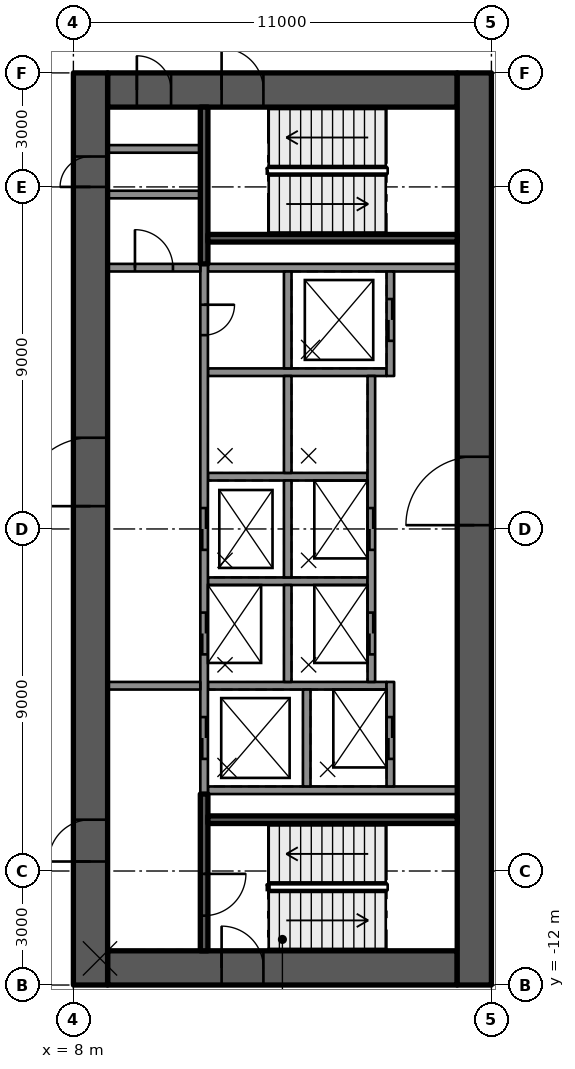
"""IFC4 building model, lengths in metres.
Left out: names, types, materials, properties, quantities, classifications, styles, units other than length and angle.
Written with IfcOpenShell. Run it as: python <this file> out.ifc"""

import sys

from ifc_helpers import new_model, si_unit, direction, frame, frame_2d, origin, place, context, subcontext, project, spatial, rectangle, extrude, element, fill, save


model = new_model("IFC4")
c1 = context("Model", 3, precision=1e-05, world=origin(), true_north=direction((0.0, 1.0)))
c2 = subcontext(c1, "Body", "Model", "MODEL_VIEW")
j1 = project(units=[si_unit("LENGTHUNIT", "METRE"), si_unit("PLANEANGLEUNIT", "RADIAN")], contexts=[c1])
p1 = place(None, origin())
s1 = spatial("IfcSite", under=j1, at=p1, CompositionType="ELEMENT")
p2 = place(p1, origin())
s2 = spatial("IfcBuilding", under=s1, at=p2, CompositionType="ELEMENT")
p3 = place(p2, frame((0.0, 0.0, 119.7)))
s3 = spatial("IfcBuildingStorey", under=s2, at=p3, CompositionType="ELEMENT", Elevation=119.7)
p4 = place(p3, frame((8.9, 11.55, 0.0), z_axis=(0.0, 0.0, 1.0), x_axis=(1.0, 0.0, 0.0)))
e1 = element("IfcWall", 1, at=p4, inside=s3, PredefinedType="SHEAR", context=c2, shape_type="SweptSolid", body=[
    extrude(rectangle(XDim=9.2, YDim=0.9, at=frame_2d((4.6, 0.0))), origin(), (0.0, 0.0, 1.0), 4.0),
])
p5 = place(p4, frame((3.0, 0.0, 0.0)))
e2 = element("IfcOpeningElement", 2, at=p5, cuts=e1, PredefinedType="OPENING", context=c2, shape_type="SweptSolid", body=[
    extrude(rectangle(XDim=1.1, YDim=2.1, at=frame_2d((0.55, 1.05))), frame((0.0, 0.46, 0.0), z_axis=(0.0, -1.0, 0.0), x_axis=(1.0, 0.0, 0.0)), (0.0, 0.0, 1.0), 0.92),
])
p6 = place(p4, frame((0.77, 0.0, 0.0)))
e3 = element("IfcOpeningElement", 3, at=p6, cuts=e1, PredefinedType="OPENING", context=c2, shape_type="SweptSolid", body=[
    extrude(rectangle(XDim=0.9, YDim=2.1, at=frame_2d((0.45, 1.05))), frame((0.0, 0.46, 0.0), z_axis=(0.0, -1.0, 0.0), x_axis=(1.0, 0.0, 0.0)), (0.0, 0.0, 1.0), 0.92),
])
p7 = place(p3, frame((8.9, -11.55, 0.0), z_axis=(0.0, 0.0, 1.0), x_axis=(1.0, 0.0, 0.0)))
e4 = element("IfcWall", 4, at=p7, inside=s3, PredefinedType="SHEAR", context=c2, shape_type="SweptSolid", body=[
    extrude(rectangle(XDim=9.2, YDim=0.9, at=frame_2d((4.6, 0.0))), origin(), (0.0, 0.0, 1.0), 4.0),
])
p8 = place(p7, frame((3.0, 0.0, 0.0)))
e5 = element("IfcOpeningElement", 5, at=p8, cuts=e4, PredefinedType="OPENING", context=c2, shape_type="SweptSolid", body=[
    extrude(rectangle(XDim=1.1, YDim=2.1, at=frame_2d((0.55, 1.05))), frame((0.0, 0.46, 0.0), z_axis=(0.0, -1.0, 0.0), x_axis=(1.0, 0.0, 0.0)), (0.0, 0.0, 1.0), 0.92),
])
p9 = place(p3, frame((8.45, -12.0, 0.0), z_axis=(0.0, 0.0, 1.0), x_axis=(0.0, 1.0, 0.0)))
e6 = element("IfcWall", 6, at=p9, inside=s3, PredefinedType="SHEAR", context=c2, shape_type="SweptSolid", body=[
    extrude(rectangle(XDim=24.0, YDim=0.9, at=frame_2d((12.0, 0.0))), origin(), (0.0, 0.0, 1.0), 4.0),
])
p10 = place(p9, frame((12.6, 0.0, 0.0)))
e7 = element("IfcOpeningElement", 7, at=p10, cuts=e6, PredefinedType="OPENING", context=c2, shape_type="SweptSolid", body=[
    extrude(rectangle(XDim=1.8, YDim=2.1, at=frame_2d((0.9, 1.05))), frame((0.0, 0.46, 0.0), z_axis=(0.0, -1.0, 0.0), x_axis=(1.0, 0.0, 0.0)), (0.0, 0.0, 1.0), 0.92),
])
p11 = place(p9, frame((3.25, 0.0, 0.0)))
e8 = element("IfcOpeningElement", 8, at=p11, cuts=e6, PredefinedType="OPENING", context=c2, shape_type="SweptSolid", body=[
    extrude(rectangle(XDim=1.1, YDim=2.1, at=frame_2d((0.55, 1.05))), frame((0.0, 0.46, 0.0), z_axis=(0.0, -1.0, 0.0), x_axis=(1.0, 0.0, 0.0)), (0.0, 0.0, 1.0), 0.92),
])
p12 = place(p9, frame((21.0, 0.0, 0.0)))
e9 = element("IfcOpeningElement", 9, at=p12, cuts=e6, PredefinedType="OPENING", context=c2, shape_type="SweptSolid", body=[
    extrude(rectangle(XDim=0.8, YDim=2.1, at=frame_2d((0.4, 1.05))), frame((0.0, 0.46, 0.0), z_axis=(0.0, -1.0, 0.0), x_axis=(1.0, 0.0, 0.0)), (0.0, 0.0, 1.0), 0.92),
])
p13 = place(p3, frame((18.55, -12.0, 0.0), z_axis=(0.0, 0.0, 1.0), x_axis=(0.0, 1.0, 0.0)))
e10 = element("IfcWall", 10, at=p13, inside=s3, PredefinedType="SHEAR", context=c2, shape_type="SweptSolid", body=[
    extrude(rectangle(XDim=24.0, YDim=0.9, at=frame_2d((12.0, 0.0))), origin(), (0.0, 0.0, 1.0), 4.0),
])
p14 = place(p13, frame((12.1, 0.0, 0.0)))
e11 = element("IfcOpeningElement", 11, at=p14, cuts=e10, PredefinedType="OPENING", context=c2, shape_type="SweptSolid", body=[
    extrude(rectangle(XDim=1.8, YDim=2.1, at=frame_2d((0.9, 1.05))), frame((0.0, 0.46, 0.0), z_axis=(0.0, -1.0, 0.0), x_axis=(1.0, 0.0, 0.0)), (0.0, 0.0, 1.0), 0.92),
])
for number, where, z_axis, x_axis in (
    (12, (11.54, -6.875, 0.0), (0.0, 0.0, 1.0), (1.0, 0.0, 0.0)),
    (13, (11.54, 6.875, 0.0), (0.0, 0.0, 1.0), (1.0, 0.0, 0.0)),
):
    element("IfcWall", number, at=place(p3, frame(where, z_axis=z_axis, x_axis=x_axis)), inside=s3, PredefinedType="SOLIDWALL", context=c2, shape_type="SweptSolid", body=[
        extrude(rectangle(XDim=6.56, YDim=0.2, at=frame_2d((3.28, 0.0))), origin(), (0.0, 0.0, 1.0), 3.59),
    ])
p15 = place(p3, frame((11.54, 4.125, 0.0), z_axis=(0.0, 0.0, 1.0), x_axis=(1.0, 0.0, 0.0)))
e14 = element("IfcWall", 14, at=p15, inside=s3, PredefinedType="SOLIDWALL", context=c2, shape_type="SweptSolid", body=[
    extrude(rectangle(XDim=4.7, YDim=0.2, at=frame_2d((2.35, 0.0))), origin(), (0.0, 0.0, 1.0), 3.59),
])
for number, where, z_axis, x_axis in (
    (15, (11.54, 1.375, 0.0), (0.0, 0.0, 1.0), (1.0, 0.0, 0.0)),
    (16, (11.54, -1.375, 0.0), (0.0, 0.0, 1.0), (1.0, 0.0, 0.0)),
):
    element("IfcWall", number, at=place(p3, frame(where, z_axis=z_axis, x_axis=x_axis)), inside=s3, PredefinedType="SOLIDWALL", context=c2, shape_type="SweptSolid", body=[
        extrude(rectangle(XDim=4.2, YDim=0.2, at=frame_2d((2.1, 0.0))), origin(), (0.0, 0.0, 1.0), 3.59),
    ])
p16 = place(p3, frame((11.54, -4.125, 0.0), z_axis=(0.0, 0.0, 1.0), x_axis=(1.0, 0.0, 0.0)))
e17 = element("IfcWall", 17, at=p16, inside=s3, PredefinedType="SOLIDWALL", context=c2, shape_type="SweptSolid", body=[
    extrude(rectangle(XDim=4.7, YDim=0.2, at=frame_2d((2.35, 0.0))), origin(), (0.0, 0.0, 1.0), 3.59),
])
p17 = place(p3, frame((11.44, 6.975, 0.0), z_axis=(0.0, 0.0, 1.0), x_axis=(0.0, -1.0, 0.0)))
e18 = element("IfcWall", 18, at=p17, inside=s3, PredefinedType="SOLIDWALL", context=c2, shape_type="SweptSolid", body=[
    extrude(rectangle(XDim=13.95, YDim=0.2, at=frame_2d((6.975, 0.0))), origin(), (0.0, 0.0, 1.0), 3.59),
])
p18 = place(p17, frame((6.425, 0.0, 0.0)))
e19 = element("IfcOpeningElement", 19, at=p18, cuts=e18, PredefinedType="OPENING", context=c2, shape_type="SweptSolid", body=[
    extrude(rectangle(XDim=1.1, YDim=2.1, at=frame_2d((0.55, 1.05))), frame((0.0, 0.11, 0.0), z_axis=(0.0, -1.0, 0.0), x_axis=(1.0, 0.0, 0.0)), (0.0, 0.0, 1.0), 0.22),
])
p19 = place(p17, frame((9.175, 0.0, 0.0)))
e20 = element("IfcOpeningElement", 20, at=p19, cuts=e18, PredefinedType="OPENING", context=c2, shape_type="SweptSolid", body=[
    extrude(rectangle(XDim=1.1, YDim=2.1, at=frame_2d((0.55, 1.05))), frame((0.0, 0.11, 0.0), z_axis=(0.0, -1.0, 0.0), x_axis=(1.0, 0.0, 0.0)), (0.0, 0.0, 1.0), 0.22),
])
p20 = place(p17, frame((11.925, 0.0, 0.0)))
e21 = element("IfcOpeningElement", 21, at=p20, cuts=e18, PredefinedType="OPENING", context=c2, shape_type="SweptSolid", body=[
    extrude(rectangle(XDim=1.1, YDim=2.1, at=frame_2d((0.55, 1.05))), frame((0.0, 0.11, 0.0), z_axis=(0.0, -1.0, 0.0), x_axis=(1.0, 0.0, 0.0)), (0.0, 0.0, 1.0), 0.22),
])
p21 = place(p17, frame((1.075, 0.0, 0.0)))
e22 = element("IfcOpeningElement", 22, at=p21, cuts=e18, PredefinedType="OPENING", context=c2, shape_type="SweptSolid", body=[
    extrude(rectangle(XDim=0.8, YDim=2.1, at=frame_2d((0.4, 1.05))), frame((0.0, 0.11, 0.0), z_axis=(0.0, -1.0, 0.0), x_axis=(1.0, 0.0, 0.0)), (0.0, 0.0, 1.0), 0.22),
])
for number, where, z_axis, x_axis in (
    (23, (13.64, 6.775, 0.0), (0.0, 0.0, 1.0), (0.0, -1.0, 0.0)),
    (24, (13.64, 4.025, 0.0), (0.0, 0.0, 1.0), (0.0, -1.0, 0.0)),
    (25, (13.64, 1.275, 0.0), (0.0, 0.0, 1.0), (0.0, -1.0, 0.0)),
    (26, (13.64, -1.475, 0.0), (0.0, 0.0, 1.0), (0.0, -1.0, 0.0)),
    (27, (14.14, -4.225, 0.0), (0.0, 0.0, 1.0), (0.0, -1.0, 0.0)),
):
    element("IfcWall", number, at=place(p3, frame(where, z_axis=z_axis, x_axis=x_axis)), inside=s3, PredefinedType="SOLIDWALL", context=c2, shape_type="SweptSolid", body=[
        extrude(rectangle(XDim=2.55, YDim=0.2, at=frame_2d((1.275, 0.0))), origin(), (0.0, 0.0, 1.0), 3.59),
    ])
p22 = place(p3, frame((16.34, 6.775, 0.0), z_axis=(0.0, 0.0, 1.0), x_axis=(0.0, -1.0, 0.0)))
e28 = element("IfcWall", 28, at=p22, inside=s3, PredefinedType="SOLIDWALL", context=c2, shape_type="SweptSolid", body=[
    extrude(rectangle(XDim=2.75, YDim=0.2, at=frame_2d((1.375, 0.0))), origin(), (0.0, 0.0, 1.0), 3.59),
])
p23 = place(p22, frame((0.725, 0.0, 0.0)))
e29 = element("IfcOpeningElement", 29, at=p23, cuts=e28, PredefinedType="OPENING", context=c2, shape_type="SweptSolid", body=[
    extrude(rectangle(XDim=1.1, YDim=2.1, at=frame_2d((0.55, 1.05))), frame((0.0, 0.11, 0.0), z_axis=(0.0, -1.0, 0.0), x_axis=(1.0, 0.0, 0.0)), (0.0, 0.0, 1.0), 0.22),
])
p24 = place(p3, frame((15.84, 4.025, 0.0), z_axis=(0.0, 0.0, 1.0), x_axis=(0.0, -1.0, 0.0)))
e30 = element("IfcWall", 30, at=p24, inside=s3, PredefinedType="SOLIDWALL", context=c2, shape_type="SweptSolid", body=[
    extrude(rectangle(XDim=8.05, YDim=0.2, at=frame_2d((4.025, 0.0))), origin(), (0.0, 0.0, 1.0), 3.59),
])
p25 = place(p24, frame((3.475, 0.0, 0.0)))
e31 = element("IfcOpeningElement", 31, at=p25, cuts=e30, PredefinedType="OPENING", context=c2, shape_type="SweptSolid", body=[
    extrude(rectangle(XDim=1.1, YDim=2.1, at=frame_2d((0.55, 1.05))), frame((0.0, 0.11, 0.0), z_axis=(0.0, -1.0, 0.0), x_axis=(1.0, 0.0, 0.0)), (0.0, 0.0, 1.0), 0.22),
])
p26 = place(p24, frame((6.225, 0.0, 0.0)))
e32 = element("IfcOpeningElement", 32, at=p26, cuts=e30, PredefinedType="OPENING", context=c2, shape_type="SweptSolid", body=[
    extrude(rectangle(XDim=1.1, YDim=2.1, at=frame_2d((0.55, 1.05))), frame((0.0, 0.11, 0.0), z_axis=(0.0, -1.0, 0.0), x_axis=(1.0, 0.0, 0.0)), (0.0, 0.0, 1.0), 0.22),
])
p27 = place(p3, frame((16.34, -4.025, 0.0), z_axis=(0.0, 0.0, 1.0), x_axis=(0.0, -1.0, 0.0)))
e33 = element("IfcWall", 33, at=p27, inside=s3, PredefinedType="SOLIDWALL", context=c2, shape_type="SweptSolid", body=[
    extrude(rectangle(XDim=2.75, YDim=0.2, at=frame_2d((1.375, 0.0))), origin(), (0.0, 0.0, 1.0), 3.59),
])
p28 = place(p27, frame((0.925, 0.0, 0.0)))
e34 = element("IfcOpeningElement", 34, at=p28, cuts=e33, PredefinedType="OPENING", context=c2, shape_type="SweptSolid", body=[
    extrude(rectangle(XDim=1.1, YDim=2.1, at=frame_2d((0.55, 1.05))), frame((0.0, 0.11, 0.0), z_axis=(0.0, -1.0, 0.0), x_axis=(1.0, 0.0, 0.0)), (0.0, 0.0, 1.0), 0.22),
])
p29 = place(p3, frame((11.44, -6.975, 0.0), z_axis=(0.0, 0.0, 1.0), x_axis=(0.0, -1.0, 0.0)))
e35 = element("IfcWall", 35, at=p29, inside=s3, PredefinedType="SOLIDWALL", context=c2, shape_type="SweptSolid", body=[
    extrude(rectangle(XDim=4.125, YDim=0.2, at=frame_2d((2.062, 0.0))), origin(), (0.0, 0.0, 1.0), 3.59),
])
p30 = place(p29, frame((2.1, 0.0, 0.0)))
e36 = element("IfcOpeningElement", 36, at=p30, cuts=e35, PredefinedType="OPENING", context=c2, shape_type="SweptSolid", body=[
    extrude(rectangle(XDim=1.1, YDim=2.1, at=frame_2d((0.55, 1.05))), frame((0.0, 0.11, 0.0), z_axis=(0.0, -1.0, 0.0), x_axis=(1.0, 0.0, 0.0)), (0.0, 0.0, 1.0), 0.22),
])
p31 = place(p3, frame((11.54, -7.65, 0.0), z_axis=(0.0, 0.0, 1.0), x_axis=(1.0, 0.0, 0.0)))
e37 = element("IfcWall", 37, at=p31, inside=s3, PredefinedType="SOLIDWALL", context=c2, shape_type="SweptSolid", body=[
    extrude(rectangle(XDim=6.56, YDim=0.2, at=frame_2d((3.28, 0.0))), origin(), (0.0, 0.0, 1.0), 3.59),
])
p32 = place(p3, frame((11.44, 11.1, 0.0), z_axis=(0.0, 0.0, 1.0), x_axis=(0.0, -1.0, 0.0)))
e38 = element("IfcWall", 38, at=p32, inside=s3, PredefinedType="SOLIDWALL", context=c2, shape_type="SweptSolid", body=[
    extrude(rectangle(XDim=4.125, YDim=0.2, at=frame_2d((2.062, 0.0))), origin(), (0.0, 0.0, 1.0), 3.59),
])
p33 = place(p3, frame((11.54, 7.65, 0.0), z_axis=(0.0, 0.0, 1.0), x_axis=(1.0, 0.0, 0.0)))
e39 = element("IfcWall", 39, at=p33, inside=s3, PredefinedType="SOLIDWALL", context=c2, shape_type="SweptSolid", body=[
    extrude(rectangle(XDim=6.56, YDim=0.2, at=frame_2d((3.28, 0.0))), origin(), (0.0, 0.0, 1.0), 3.59),
])
p34 = place(p3, frame((8.9, -4.125, 0.0), z_axis=(0.0, 0.0, 1.0), x_axis=(1.0, 0.0, 0.0)))
e40 = element("IfcWall", 40, at=p34, inside=s3, PredefinedType="PARTITIONING", context=c2, shape_type="SweptSolid", body=[
    extrude(rectangle(XDim=2.44, YDim=0.2, at=frame_2d((1.22, 0.0))), origin(), (0.0, 0.0, 1.0), 3.59),
])
p35 = place(p3, frame((8.9, 6.875, 0.0), z_axis=(0.0, 0.0, 1.0), x_axis=(1.0, 0.0, 0.0)))
e41 = element("IfcWall", 41, at=p35, inside=s3, PredefinedType="PARTITIONING", context=c2, shape_type="SweptSolid", body=[
    extrude(rectangle(XDim=2.44, YDim=0.2, at=frame_2d((1.22, 0.0))), origin(), (0.0, 0.0, 1.0), 3.59),
])
p36 = place(p35, frame((0.72, 0.0, 0.0)))
e42 = element("IfcOpeningElement", 42, at=p36, cuts=e41, PredefinedType="OPENING", context=c2, shape_type="SweptSolid", body=[
    extrude(rectangle(XDim=1.0, YDim=2.1, at=frame_2d((0.5, 1.05))), frame((0.0, 0.11, 0.0), z_axis=(0.0, -1.0, 0.0), x_axis=(1.0, 0.0, 0.0)), (0.0, 0.0, 1.0), 0.22),
])
for number, where, z_axis, x_axis in (
    (43, (8.9, 10.0, 0.0), (0.0, 0.0, 1.0), (1.0, 0.0, 0.0)),
    (44, (8.9, 8.8, 0.0), (0.0, 0.0, 1.0), (1.0, 0.0, 0.0)),
):
    element("IfcWall", number, at=place(p3, frame(where, z_axis=z_axis, x_axis=x_axis)), inside=s3, PredefinedType="PARTITIONING", context=c2, shape_type="SweptSolid", body=[
        extrude(rectangle(XDim=2.44, YDim=0.2, at=frame_2d((1.22, 0.0))), origin(), (0.0, 0.0, 1.0), 3.59),
    ])
p37 = place(p23, origin())
e45 = element("IfcDoor", 45, at=p37, inside=s3, OperationType="DOUBLE_DOOR_SLIDING", PredefinedType="DOOR", context=c2, shape_type="SweptSolid", body=[
    extrude(rectangle(XDim=1.1, YDim=2.1, at=frame_2d((0.55, 1.05))), frame((0.0, 0.025, 0.0), z_axis=(0.0, -1.0, 0.0), x_axis=(1.0, 0.0, 0.0)), (0.0, 0.0, 1.0), 0.05),
])
fill(e29, e45)
p38 = place(p18, origin())
e46 = element("IfcDoor", 46, at=p38, inside=s3, OperationType="DOUBLE_DOOR_SLIDING", PredefinedType="DOOR", context=c2, shape_type="SweptSolid", body=[
    extrude(rectangle(XDim=1.1, YDim=2.1, at=frame_2d((0.55, 1.05))), frame((0.0, 0.025, 0.0), z_axis=(0.0, -1.0, 0.0), x_axis=(1.0, 0.0, 0.0)), (0.0, 0.0, 1.0), 0.05),
])
fill(e19, e46)
p39 = place(p25, origin())
e47 = element("IfcDoor", 47, at=p39, inside=s3, OperationType="DOUBLE_DOOR_SLIDING", PredefinedType="DOOR", context=c2, shape_type="SweptSolid", body=[
    extrude(rectangle(XDim=1.1, YDim=2.1, at=frame_2d((0.55, 1.05))), frame((0.0, 0.025, 0.0), z_axis=(0.0, -1.0, 0.0), x_axis=(1.0, 0.0, 0.0)), (0.0, 0.0, 1.0), 0.05),
])
fill(e31, e47)
p40 = place(p19, origin())
e48 = element("IfcDoor", 48, at=p40, inside=s3, OperationType="DOUBLE_DOOR_SLIDING", PredefinedType="DOOR", context=c2, shape_type="SweptSolid", body=[
    extrude(rectangle(XDim=1.1, YDim=2.1, at=frame_2d((0.55, 1.05))), frame((0.0, 0.025, 0.0), z_axis=(0.0, -1.0, 0.0), x_axis=(1.0, 0.0, 0.0)), (0.0, 0.0, 1.0), 0.05),
])
fill(e20, e48)
p41 = place(p26, origin())
e49 = element("IfcDoor", 49, at=p41, inside=s3, OperationType="DOUBLE_DOOR_SLIDING", PredefinedType="DOOR", context=c2, shape_type="SweptSolid", body=[
    extrude(rectangle(XDim=1.1, YDim=2.1, at=frame_2d((0.55, 1.05))), frame((0.0, 0.025, 0.0), z_axis=(0.0, -1.0, 0.0), x_axis=(1.0, 0.0, 0.0)), (0.0, 0.0, 1.0), 0.05),
])
fill(e32, e49)
p42 = place(p20, origin())
e50 = element("IfcDoor", 50, at=p42, inside=s3, OperationType="DOUBLE_DOOR_SLIDING", PredefinedType="DOOR", context=c2, shape_type="SweptSolid", body=[
    extrude(rectangle(XDim=1.1, YDim=2.1, at=frame_2d((0.55, 1.05))), frame((0.0, 0.025, 0.0), z_axis=(0.0, -1.0, 0.0), x_axis=(1.0, 0.0, 0.0)), (0.0, 0.0, 1.0), 0.05),
])
fill(e21, e50)
p43 = place(p28, origin())
e51 = element("IfcDoor", 51, at=p43, inside=s3, OperationType="DOUBLE_DOOR_SLIDING", PredefinedType="DOOR", context=c2, shape_type="SweptSolid", body=[
    extrude(rectangle(XDim=1.1, YDim=2.1, at=frame_2d((0.55, 1.05))), frame((0.0, 0.025, 0.0), z_axis=(0.0, -1.0, 0.0), x_axis=(1.0, 0.0, 0.0)), (0.0, 0.0, 1.0), 0.05),
])
fill(e34, e51)
p44 = place(p21, origin())
e52 = element("IfcDoor", 52, at=p44, inside=s3, OperationType="SINGLE_SWING_LEFT", PredefinedType="DOOR", context=c2, shape_type="SweptSolid", body=[
    extrude(rectangle(XDim=0.8, YDim=2.1, at=frame_2d((0.4, 1.05))), frame((0.0, 0.025, 0.0), z_axis=(0.0, -1.0, 0.0), x_axis=(1.0, 0.0, 0.0)), (0.0, 0.0, 1.0), 0.05),
])
fill(e22, e52)
p45 = place(p10, origin())
e53 = element("IfcDoor", 53, at=p45, inside=s3, OperationType="SINGLE_SWING_RIGHT", PredefinedType="DOOR", context=c2, shape_type="SweptSolid", body=[
    extrude(rectangle(XDim=1.8, YDim=2.1, at=frame_2d((0.9, 1.05))), frame((0.0, 0.025, 0.0), z_axis=(0.0, -1.0, 0.0), x_axis=(1.0, 0.0, 0.0)), (0.0, 0.0, 1.0), 0.05),
])
fill(e7, e53)
p46 = place(p14, origin())
e54 = element("IfcDoor", 54, at=p46, inside=s3, OperationType="SINGLE_SWING_RIGHT", PredefinedType="DOOR", context=c2, shape_type="SweptSolid", body=[
    extrude(rectangle(XDim=1.8, YDim=2.1, at=frame_2d((0.9, 1.05))), frame((0.0, 0.025, 0.0), z_axis=(0.0, -1.0, 0.0), x_axis=(1.0, 0.0, 0.0)), (0.0, 0.0, 1.0), 0.05),
])
fill(e11, e54)
p47 = place(p11, origin())
e55 = element("IfcDoor", 55, at=p47, inside=s3, OperationType="SINGLE_SWING_LEFT", PredefinedType="DOOR", context=c2, shape_type="SweptSolid", body=[
    extrude(rectangle(XDim=1.1, YDim=2.1, at=frame_2d((0.55, 1.05))), frame((0.0, 0.025, 0.0), z_axis=(0.0, -1.0, 0.0), x_axis=(1.0, 0.0, 0.0)), (0.0, 0.0, 1.0), 0.05),
])
fill(e8, e55)
p48 = place(p8, origin())
e56 = element("IfcDoor", 56, at=p48, inside=s3, OperationType="SINGLE_SWING_LEFT", PredefinedType="DOOR", context=c2, shape_type="SweptSolid", body=[
    extrude(rectangle(XDim=1.1, YDim=2.1, at=frame_2d((0.55, 1.05))), frame((0.0, 0.025, 0.0), z_axis=(0.0, -1.0, 0.0), x_axis=(1.0, 0.0, 0.0)), (0.0, 0.0, 1.0), 0.05),
])
fill(e5, e56)
p49 = place(p5, origin())
e57 = element("IfcDoor", 57, at=p49, inside=s3, OperationType="SINGLE_SWING_LEFT", PredefinedType="DOOR", context=c2, shape_type="SweptSolid", body=[
    extrude(rectangle(XDim=1.1, YDim=2.1, at=frame_2d((0.55, 1.05))), frame((0.0, 0.025, 0.0), z_axis=(0.0, -1.0, 0.0), x_axis=(1.0, 0.0, 0.0)), (0.0, 0.0, 1.0), 0.05),
])
fill(e2, e57)
p50 = place(p30, origin())
e58 = element("IfcDoor", 58, at=p50, inside=s3, OperationType="SINGLE_SWING_RIGHT", PredefinedType="DOOR", context=c2, shape_type="SweptSolid", body=[
    extrude(rectangle(XDim=1.1, YDim=2.1, at=frame_2d((0.55, 1.05))), frame((0.0, 0.025, 0.0), z_axis=(0.0, -1.0, 0.0), x_axis=(1.0, 0.0, 0.0)), (0.0, 0.0, 1.0), 0.05),
])
fill(e36, e58)
p51 = place(p6, origin())
e59 = element("IfcDoor", 59, at=p51, inside=s3, OperationType="SINGLE_SWING_LEFT", PredefinedType="DOOR", context=c2, shape_type="SweptSolid", body=[
    extrude(rectangle(XDim=0.9, YDim=2.1, at=frame_2d((0.45, 1.05))), frame((0.0, 0.025, 0.0), z_axis=(0.0, -1.0, 0.0), x_axis=(1.0, 0.0, 0.0)), (0.0, 0.0, 1.0), 0.05),
])
fill(e3, e59)
p52 = place(p12, origin())
e60 = element("IfcDoor", 60, at=p52, inside=s3, OperationType="SINGLE_SWING_RIGHT", PredefinedType="DOOR", context=c2, shape_type="SweptSolid", body=[
    extrude(rectangle(XDim=0.8, YDim=2.1, at=frame_2d((0.4, 1.05))), frame((0.0, 0.025, 0.0), z_axis=(0.0, -1.0, 0.0), x_axis=(1.0, 0.0, 0.0)), (0.0, 0.0, 1.0), 0.05),
])
fill(e9, e60)
p53 = place(p36, origin())
e61 = element("IfcDoor", 61, at=p53, inside=s3, OperationType="SINGLE_SWING_RIGHT", PredefinedType="DOOR", context=c2, shape_type="SweptSolid", body=[
    extrude(rectangle(XDim=1.0, YDim=2.1, at=frame_2d((0.5, 1.05))), frame((0.0, 0.025, 0.0), z_axis=(0.0, -1.0, 0.0), x_axis=(1.0, 0.0, 0.0)), (0.0, 0.0, 1.0), 0.05),
])
fill(e42, e61)
save(model, sys.argv[1])
